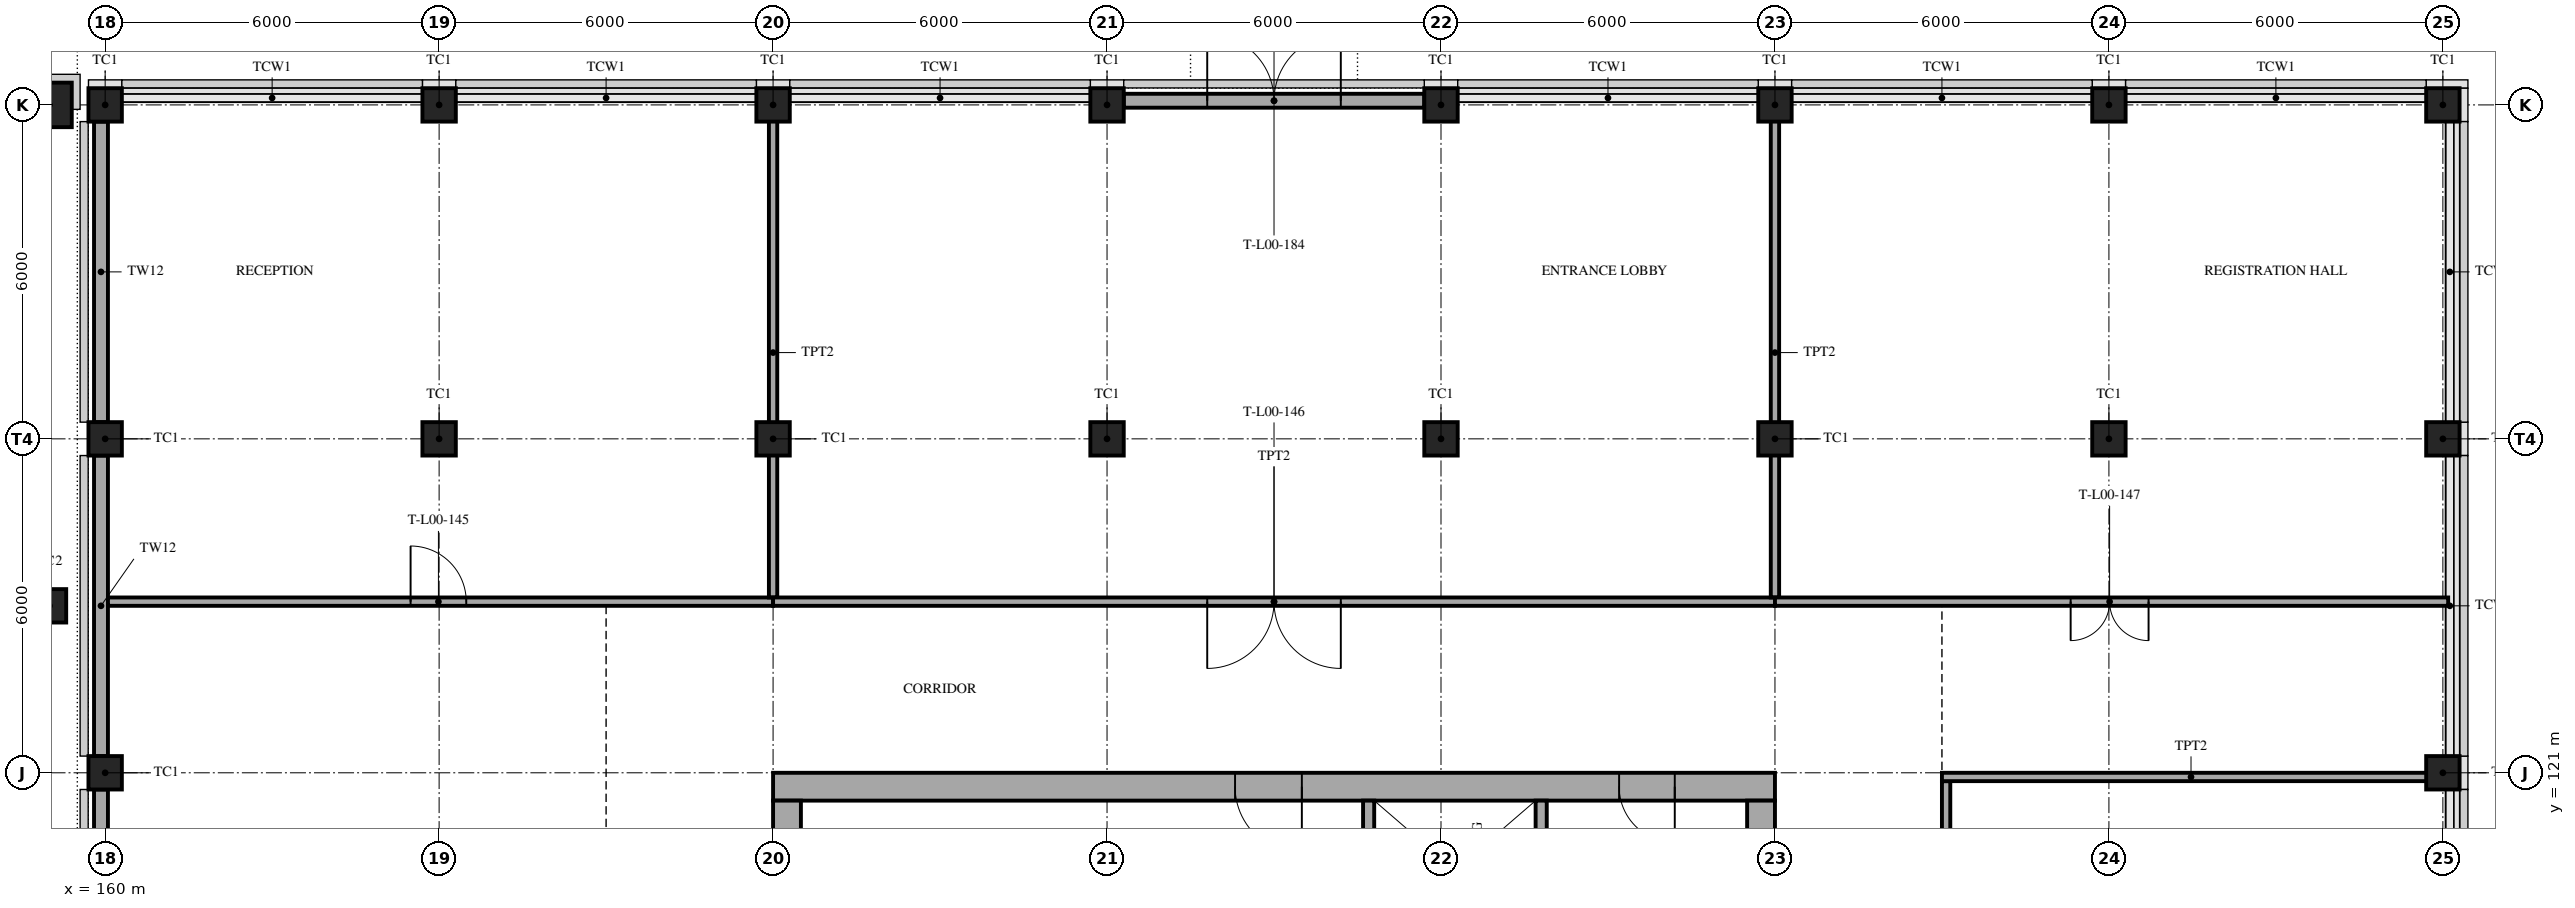
"""IFC4 building model, lengths in metres.
Left out: names, types, materials, properties, quantities, classifications, styles, units other than length and angle.
Written with IfcOpenShell. Run it as: python <this file> out.ifc"""

import sys

from ifc_helpers import new_model, si_unit, direction, frame, frame_2d, origin, origin_2d, place, context, subcontext, project, spatial, rectangle, hollow_rectangle, extrude, element, fill, save


model = new_model("IFC4")
c1 = context("Model", 3, precision=1e-05, world=origin(), true_north=direction((0.0, 1.0)))
c2 = subcontext(c1, "Body", "Model", "MODEL_VIEW")
j1 = project(units=[si_unit("LENGTHUNIT", "METRE"), si_unit("PLANEANGLEUNIT", "RADIAN")], contexts=[c1])
p1 = place(None, origin())
s1 = spatial("IfcSite", under=j1, at=p1, CompositionType="ELEMENT")
p2 = place(p1, origin())
s2 = spatial("IfcBuilding", under=s1, at=p2, CompositionType="ELEMENT")
p3 = place(p2, origin())
s3 = spatial("IfcBuildingStorey", under=s2, at=p3, CompositionType="ELEMENT", Elevation=0.0)
for number, where, z_axis, x_axis in (
    (1, (160.0, 121.0, 0.0), (0.0, 0.0, 1.0), (1.0, 0.0, 0.0)),
    (2, (160.0, 127.0, 0.0), (0.0, 0.0, 1.0), (1.0, 0.0, 0.0)),
    (3, (160.0, 133.0, 0.0), (0.0, 0.0, 1.0), (1.0, 0.0, 0.0)),
    (4, (166.0, 133.0, 0.0), (0.0, 0.0, 1.0), (1.0, 0.0, 0.0)),
    (5, (172.0, 133.0, 0.0), (0.0, 0.0, 1.0), (1.0, 0.0, 0.0)),
    (6, (178.0, 133.0, 0.0), (0.0, 0.0, 1.0), (1.0, 0.0, 0.0)),
    (7, (184.0, 133.0, 0.0), (0.0, 0.0, 1.0), (1.0, 0.0, 0.0)),
    (8, (190.0, 133.0, 0.0), (0.0, 0.0, 1.0), (1.0, 0.0, 0.0)),
    (9, (196.0, 133.0, 0.0), (0.0, 0.0, 1.0), (1.0, 0.0, 0.0)),
    (10, (202.0, 121.0, 0.0), (0.0, 0.0, 1.0), (1.0, 0.0, 0.0)),
    (11, (202.0, 127.0, 0.0), (0.0, 0.0, 1.0), (1.0, 0.0, 0.0)),
    (12, (202.0, 133.0, 0.0), (0.0, 0.0, 1.0), (1.0, 0.0, 0.0)),
    (13, (166.0, 127.0, 0.0), (0.0, 0.0, 1.0), (1.0, 0.0, 0.0)),
    (14, (172.0, 127.0, 0.0), (0.0, 0.0, 1.0), (1.0, 0.0, 0.0)),
    (15, (178.0, 127.0, 0.0), (0.0, 0.0, 1.0), (1.0, 0.0, 0.0)),
    (16, (184.0, 127.0, 0.0), (0.0, 0.0, 1.0), (1.0, 0.0, 0.0)),
    (17, (190.0, 127.0, 0.0), (0.0, 0.0, 1.0), (1.0, 0.0, 0.0)),
    (18, (196.0, 127.0, 0.0), (0.0, 0.0, 1.0), (1.0, 0.0, 0.0)),
):
    element("IfcColumn", number, at=place(p3, frame(where, z_axis=z_axis, x_axis=x_axis)), inside=s3, PredefinedType="COLUMN", context=c2, shape_type="SweptSolid", body=[
        extrude(hollow_rectangle(XDim=0.6, YDim=0.6, WallThickness=0.04, at=origin_2d()), origin(), (0.0, 0.0, 1.0), 5.0),
    ])
p4 = place(p3, frame((172.0, 120.75, 0.0), z_axis=(0.0, 0.0, 1.0), x_axis=(1.0, 0.0, 0.0)))
e19 = element("IfcWall", 19, at=p4, inside=s3, PredefinedType="SHEAR", context=c2, shape_type="SweptSolid", body=[
    extrude(rectangle(XDim=18.0, YDim=0.5, at=frame_2d((9.0, 0.0))), origin(), (0.0, 0.0, 1.0), 5.0),
])
p5 = place(p4, frame((8.3, 0.0, 0.0)))
e20 = element("IfcOpeningElement", 20, at=p5, cuts=e19, PredefinedType="OPENING", context=c2, shape_type="SweptSolid", body=[
    extrude(rectangle(XDim=1.2, YDim=2.1, at=frame_2d((0.6, 1.05))), frame((0.0, 0.26, 0.0), z_axis=(0.0, -1.0, 0.0), x_axis=(1.0, 0.0, 0.0)), (0.0, 0.0, 1.0), 0.52),
])
p6 = place(p4, frame((15.2, 0.0, 0.0)))
e21 = element("IfcOpeningElement", 21, at=p6, cuts=e19, PredefinedType="OPENING", context=c2, shape_type="SweptSolid", body=[
    extrude(rectangle(XDim=1.0, YDim=2.1, at=frame_2d((0.5, 1.05))), frame((0.0, 0.26, 0.0), z_axis=(0.0, -1.0, 0.0), x_axis=(1.0, 0.0, 0.0)), (0.0, 0.0, 1.0), 0.52),
])
p7 = place(p3, frame((172.25, 103.5, 0.0), z_axis=(0.0, 0.0, 1.0), x_axis=(0.0, 1.0, 0.0)))
e22 = element("IfcWall", 22, at=p7, inside=s3, PredefinedType="SHEAR", context=c2, shape_type="SweptSolid", body=[
    extrude(rectangle(XDim=17.0, YDim=0.5, at=frame_2d((8.5, 0.0))), origin(), (0.0, 0.0, 1.0), 5.0),
])
p8 = place(p7, frame((7.2, 0.0, 0.0)))
e23 = element("IfcOpeningElement", 23, at=p8, cuts=e22, PredefinedType="OPENING", context=c2, shape_type="SweptSolid", body=[
    extrude(rectangle(XDim=1.4, YDim=2.1, at=frame_2d((0.7, 1.05))), frame((0.0, 0.26, 0.0), z_axis=(0.0, -1.0, 0.0), x_axis=(1.0, 0.0, 0.0)), (0.0, 0.0, 1.0), 0.52),
])
p9 = place(p3, frame((189.75, 103.5, 0.0), z_axis=(0.0, 0.0, 1.0), x_axis=(0.0, 1.0, 0.0)))
e24 = element("IfcWall", 24, at=p9, inside=s3, PredefinedType="SHEAR", context=c2, shape_type="SweptSolid", body=[
    extrude(rectangle(XDim=17.0, YDim=0.5, at=frame_2d((8.5, 0.0))), origin(), (0.0, 0.0, 1.0), 5.0),
])
p10 = place(p9, frame((7.2, 0.0, 0.0)))
e25 = element("IfcOpeningElement", 25, at=p10, cuts=e24, PredefinedType="OPENING", context=c2, shape_type="SweptSolid", body=[
    extrude(rectangle(XDim=1.4, YDim=2.1, at=frame_2d((0.7, 1.05))), frame((0.0, 0.26, 0.0), z_axis=(0.0, -1.0, 0.0), x_axis=(1.0, 0.0, 0.0)), (0.0, 0.0, 1.0), 0.52),
])
p11 = place(p3, frame((159.0, 124.0, 0.0), z_axis=(0.0, 0.0, 1.0), x_axis=(1.0, 0.0, 0.0)))
e26 = element("IfcColumn", 26, at=p11, inside=s3, PredefinedType="COLUMN", context=c2, shape_type="SweptSolid", body=[
    extrude(rectangle(XDim=0.6, YDim=0.6, at=origin_2d()), origin(), (0.0, 0.0, 1.0), 5.0),
])
p12 = place(p3, frame((159.0, 133.0, 0.0), z_axis=(0.0, 0.0, 1.0), x_axis=(1.0, 0.0, 0.0)))
e27 = element("IfcColumn", 27, at=p12, inside=s3, PredefinedType="COLUMN", context=c2, shape_type="SweptSolid", body=[
    extrude(rectangle(XDim=0.8, YDim=0.8, at=origin_2d()), origin(), (0.0, 0.0, 1.0), 5.0),
])
p13 = place(p3, frame((178.3, 133.075, 0.0), z_axis=(0.0, 0.0, 1.0), x_axis=(1.0, 0.0, 0.0)))
e28 = element("IfcWall", 28, at=p13, inside=s3, PredefinedType="SOLIDWALL", context=c2, shape_type="SweptSolid", body=[
    extrude(rectangle(XDim=5.4, YDim=0.25, at=frame_2d((2.7, 0.0))), origin(), (0.0, 0.0, 1.0), 4.35),
])
p14 = place(p13, frame((1.5, 0.0, 0.0)))
e29 = element("IfcOpeningElement", 29, at=p14, cuts=e28, PredefinedType="OPENING", context=c2, shape_type="SweptSolid", body=[
    extrude(rectangle(XDim=2.4, YDim=2.1, at=frame_2d((1.2, 1.05))), frame((0.0, 0.135, 0.0), z_axis=(0.0, -1.0, 0.0), x_axis=(1.0, 0.0, 0.0)), (0.0, 0.0, 1.0), 0.27),
])
p15 = place(p3, frame((159.925, 115.3, 0.0), z_axis=(0.0, 0.0, 1.0), x_axis=(0.0, 1.0, 0.0)))
e30 = element("IfcWall", 30, at=p15, inside=s3, PredefinedType="SOLIDWALL", context=c2, shape_type="SweptSolid", body=[
    extrude(rectangle(XDim=5.4, YDim=0.25, at=frame_2d((2.7, 0.0))), origin(), (0.0, 0.0, 1.0), 4.35),
])
p16 = place(p15, frame((0.6, 0.0, 0.0)))
e31 = element("IfcOpeningElement", 31, at=p16, cuts=e30, PredefinedType="OPENING", context=c2, shape_type="SweptSolid", body=[
    extrude(rectangle(XDim=1.8, YDim=2.1, at=frame_2d((0.9, 1.05))), frame((0.0, 0.135, 0.0), z_axis=(0.0, -1.0, 0.0), x_axis=(1.0, 0.0, 0.0)), (0.0, 0.0, 1.0), 0.27),
])
for number, where, z_axis, x_axis in (
    (32, (159.925, 121.3, 0.0), (0.0, 0.0, 1.0), (0.0, 1.0, 0.0)),
    (33, (159.925, 127.3, 0.0), (0.0, 0.0, 1.0), (0.0, 1.0, 0.0)),
):
    element("IfcWall", number, at=place(p3, frame(where, z_axis=z_axis, x_axis=x_axis)), inside=s3, PredefinedType="SOLIDWALL", context=c2, shape_type="SweptSolid", body=[
        extrude(rectangle(XDim=5.4, YDim=0.25, at=frame_2d((2.7, 0.0))), origin(), (0.0, 0.0, 1.0), 4.35),
    ])
p17 = place(p3, frame((182.7, 115.7, 0.0), z_axis=(0.0, 0.0, 1.0), x_axis=(0.0, 1.0, 0.0)))
e34 = element("IfcWall", 34, at=p17, inside=s3, PredefinedType="SOLIDWALL", context=c2, shape_type="SweptSolid", body=[
    extrude(rectangle(XDim=4.8, YDim=0.2, at=frame_2d((2.4, 0.0))), origin(), (0.0, 0.0, 1.0), 4.8),
])
p18 = place(p17, frame((0.5, 0.0, 0.0)))
e35 = element("IfcOpeningElement", 35, at=p18, cuts=e34, PredefinedType="OPENING", context=c2, shape_type="SweptSolid", body=[
    extrude(rectangle(XDim=1.1, YDim=2.1, at=frame_2d((0.55, 1.05))), frame((0.0, 0.11, 0.0), z_axis=(0.0, -1.0, 0.0), x_axis=(1.0, 0.0, 0.0)), (0.0, 0.0, 1.0), 0.22),
])
p19 = place(p17, frame((3.0, 0.0, 0.0)))
e36 = element("IfcOpeningElement", 36, at=p19, cuts=e34, PredefinedType="OPENING", context=c2, shape_type="SweptSolid", body=[
    extrude(rectangle(XDim=1.1, YDim=2.1, at=frame_2d((0.55, 1.05))), frame((0.0, 0.11, 0.0), z_axis=(0.0, -1.0, 0.0), x_axis=(1.0, 0.0, 0.0)), (0.0, 0.0, 1.0), 0.22),
])
p20 = place(p3, frame((185.8, 115.7, 0.0), z_axis=(0.0, 0.0, 1.0), x_axis=(0.0, 1.0, 0.0)))
e37 = element("IfcWall", 37, at=p20, inside=s3, PredefinedType="SOLIDWALL", context=c2, shape_type="SweptSolid", body=[
    extrude(rectangle(XDim=4.8, YDim=0.2, at=frame_2d((2.4, 0.0))), origin(), (0.0, 0.0, 1.0), 4.8),
])
p21 = place(p3, frame((160.05, 124.075, 0.0), z_axis=(0.0, 0.0, 1.0), x_axis=(1.0, 0.0, 0.0)))
e38 = element("IfcWall", 38, at=p21, inside=s3, PredefinedType="PARTITIONING", context=c2, shape_type="SweptSolid", body=[
    extrude(rectangle(XDim=11.95, YDim=0.15, at=frame_2d((5.975, 0.0))), origin(), (0.0, 0.0, 1.0), 4.2),
])
p22 = place(p21, frame((5.438, 0.0, 0.0)))
e39 = element("IfcOpeningElement", 39, at=p22, cuts=e38, PredefinedType="OPENING", context=c2, shape_type="SweptSolid", body=[
    extrude(rectangle(XDim=1.0, YDim=2.1, at=frame_2d((0.5, 1.05))), frame((0.0, 0.085, 0.0), z_axis=(0.0, -1.0, 0.0), x_axis=(1.0, 0.0, 0.0)), (0.0, 0.0, 1.0), 0.17),
])
p23 = place(p3, frame((172.0, 124.15, 0.0), z_axis=(0.0, 0.0, 1.0), x_axis=(0.0, 1.0, 0.0)))
e40 = element("IfcWall", 40, at=p23, inside=s3, PredefinedType="PARTITIONING", context=c2, shape_type="SweptSolid", body=[
    extrude(rectangle(XDim=8.8, YDim=0.15, at=frame_2d((4.4, 0.0))), origin(), (0.0, 0.0, 1.0), 4.2),
])
p24 = place(p3, frame((172.0, 124.075, 0.0), z_axis=(0.0, 0.0, 1.0), x_axis=(1.0, 0.0, 0.0)))
e41 = element("IfcWall", 41, at=p24, inside=s3, PredefinedType="PARTITIONING", context=c2, shape_type="SweptSolid", body=[
    extrude(rectangle(XDim=18.0, YDim=0.15, at=frame_2d((9.0, 0.0))), origin(), (0.0, 0.0, 1.0), 4.2),
])
p25 = place(p24, frame((7.8, 0.0, 0.0)))
e42 = element("IfcOpeningElement", 42, at=p25, cuts=e41, PredefinedType="OPENING", context=c2, shape_type="SweptSolid", body=[
    extrude(rectangle(XDim=2.4, YDim=2.1, at=frame_2d((1.2, 1.05))), frame((0.0, 0.085, 0.0), z_axis=(0.0, -1.0, 0.0), x_axis=(1.0, 0.0, 0.0)), (0.0, 0.0, 1.0), 0.17),
])
p26 = place(p3, frame((190.0, 124.15, 0.0), z_axis=(0.0, 0.0, 1.0), x_axis=(0.0, 1.0, 0.0)))
e43 = element("IfcWall", 43, at=p26, inside=s3, PredefinedType="PARTITIONING", context=c2, shape_type="SweptSolid", body=[
    extrude(rectangle(XDim=8.8, YDim=0.15, at=frame_2d((4.4, 0.0))), origin(), (0.0, 0.0, 1.0), 4.2),
])
p27 = place(p3, frame((190.0, 124.075, 0.0), z_axis=(0.0, 0.0, 1.0), x_axis=(1.0, 0.0, 0.0)))
e44 = element("IfcWall", 44, at=p27, inside=s3, PredefinedType="PARTITIONING", context=c2, shape_type="SweptSolid", body=[
    extrude(rectangle(XDim=12.095, YDim=0.15, at=frame_2d((6.047, 0.0))), origin(), (0.0, 0.0, 1.0), 4.2),
])
p28 = place(p27, frame((5.312, 0.0, 0.0)))
e45 = element("IfcOpeningElement", 45, at=p28, cuts=e44, PredefinedType="OPENING", context=c2, shape_type="SweptSolid", body=[
    extrude(rectangle(XDim=1.4, YDim=2.1, at=frame_2d((0.7, 1.05))), frame((0.0, 0.085, 0.0), z_axis=(0.0, -1.0, 0.0), x_axis=(1.0, 0.0, 0.0)), (0.0, 0.0, 1.0), 0.17),
])
p29 = place(p3, frame((193.075, 115.0, 0.0), z_axis=(0.0, 0.0, 1.0), x_axis=(0.0, 1.0, 0.0)))
e46 = element("IfcWall", 46, at=p29, inside=s3, PredefinedType="PARTITIONING", context=c2, shape_type="SweptSolid", body=[
    extrude(rectangle(XDim=5.85, YDim=0.15, at=frame_2d((2.925, 0.0))), origin(), (0.0, 0.0, 1.0), 4.2),
])
p30 = place(p29, frame((2.462, 0.0, 0.0)))
e47 = element("IfcOpeningElement", 47, at=p30, cuts=e46, PredefinedType="OPENING", context=c2, shape_type="SweptSolid", body=[
    extrude(rectangle(XDim=1.0, YDim=2.1, at=frame_2d((0.5, 1.05))), frame((0.0, 0.085, 0.0), z_axis=(0.0, -1.0, 0.0), x_axis=(1.0, 0.0, 0.0)), (0.0, 0.0, 1.0), 0.17),
])
p31 = place(p3, frame((193.0, 120.925, 0.0), z_axis=(0.0, 0.0, 1.0), x_axis=(1.0, 0.0, 0.0)))
e48 = element("IfcWall", 48, at=p31, inside=s3, PredefinedType="PARTITIONING", context=c2, shape_type="SweptSolid", body=[
    extrude(rectangle(XDim=8.95, YDim=0.15, at=frame_2d((4.475, 0.0))), origin(), (0.0, 0.0, 1.0), 4.2),
])
p32 = place(p14, origin())
e49 = element("IfcDoor", 49, at=p32, inside=s3, OperationType="DOUBLE_DOOR_SINGLE_SWING", PredefinedType="DOOR", context=c2, shape_type="SweptSolid", body=[
    extrude(rectangle(XDim=2.4, YDim=2.1, at=frame_2d((1.2, 1.05))), frame((0.0, 0.025, 0.0), z_axis=(0.0, -1.0, 0.0), x_axis=(1.0, 0.0, 0.0)), (0.0, 0.0, 1.0), 0.05),
])
fill(e29, e49)
p33 = place(p5, frame((1.2, 0.0, 0.0), z_axis=(0.0, 0.0, 1.0), x_axis=(-1.0, 0.0, 0.0)))
e50 = element("IfcDoor", 50, at=p33, inside=s3, OperationType="SINGLE_SWING_LEFT", PredefinedType="DOOR", context=c2, shape_type="SweptSolid", body=[
    extrude(rectangle(XDim=1.2, YDim=2.1, at=frame_2d((0.6, 1.05))), frame((0.0, 0.025, 0.0), z_axis=(0.0, -1.0, 0.0), x_axis=(1.0, 0.0, 0.0)), (0.0, 0.0, 1.0), 0.05),
])
fill(e20, e50)
p34 = place(p6, frame((1.0, 0.0, 0.0), z_axis=(0.0, 0.0, 1.0), x_axis=(-1.0, 0.0, 0.0)))
e51 = element("IfcDoor", 51, at=p34, inside=s3, OperationType="SINGLE_SWING_LEFT", PredefinedType="DOOR", context=c2, shape_type="SweptSolid", body=[
    extrude(rectangle(XDim=1.0, YDim=2.1, at=frame_2d((0.5, 1.05))), frame((0.0, 0.025, 0.0), z_axis=(0.0, -1.0, 0.0), x_axis=(1.0, 0.0, 0.0)), (0.0, 0.0, 1.0), 0.05),
])
fill(e21, e51)
p35 = place(p22, origin())
e52 = element("IfcDoor", 52, at=p35, inside=s3, OperationType="SINGLE_SWING_LEFT", PredefinedType="DOOR", context=c2, shape_type="SweptSolid", body=[
    extrude(rectangle(XDim=1.0, YDim=2.1, at=frame_2d((0.5, 1.05))), frame((0.0, 0.025, 0.0), z_axis=(0.0, -1.0, 0.0), x_axis=(1.0, 0.0, 0.0)), (0.0, 0.0, 1.0), 0.05),
])
fill(e39, e52)
p36 = place(p25, frame((2.4, 0.0, 0.0), z_axis=(0.0, 0.0, 1.0), x_axis=(-1.0, 0.0, 0.0)))
e53 = element("IfcDoor", 53, at=p36, inside=s3, OperationType="DOUBLE_DOOR_SINGLE_SWING", PredefinedType="DOOR", context=c2, shape_type="SweptSolid", body=[
    extrude(rectangle(XDim=2.4, YDim=2.1, at=frame_2d((1.2, 1.05))), frame((0.0, 0.025, 0.0), z_axis=(0.0, -1.0, 0.0), x_axis=(1.0, 0.0, 0.0)), (0.0, 0.0, 1.0), 0.05),
])
fill(e42, e53)
p37 = place(p28, frame((1.4, 0.0, 0.0), z_axis=(0.0, 0.0, 1.0), x_axis=(-1.0, 0.0, 0.0)))
e54 = element("IfcDoor", 54, at=p37, inside=s3, OperationType="DOUBLE_DOOR_SINGLE_SWING", PredefinedType="DOOR", context=c2, shape_type="SweptSolid", body=[
    extrude(rectangle(XDim=1.4, YDim=2.1, at=frame_2d((0.7, 1.05))), frame((0.0, 0.025, 0.0), z_axis=(0.0, -1.0, 0.0), x_axis=(1.0, 0.0, 0.0)), (0.0, 0.0, 1.0), 0.05),
])
fill(e45, e54)
save(model, sys.argv[1])
